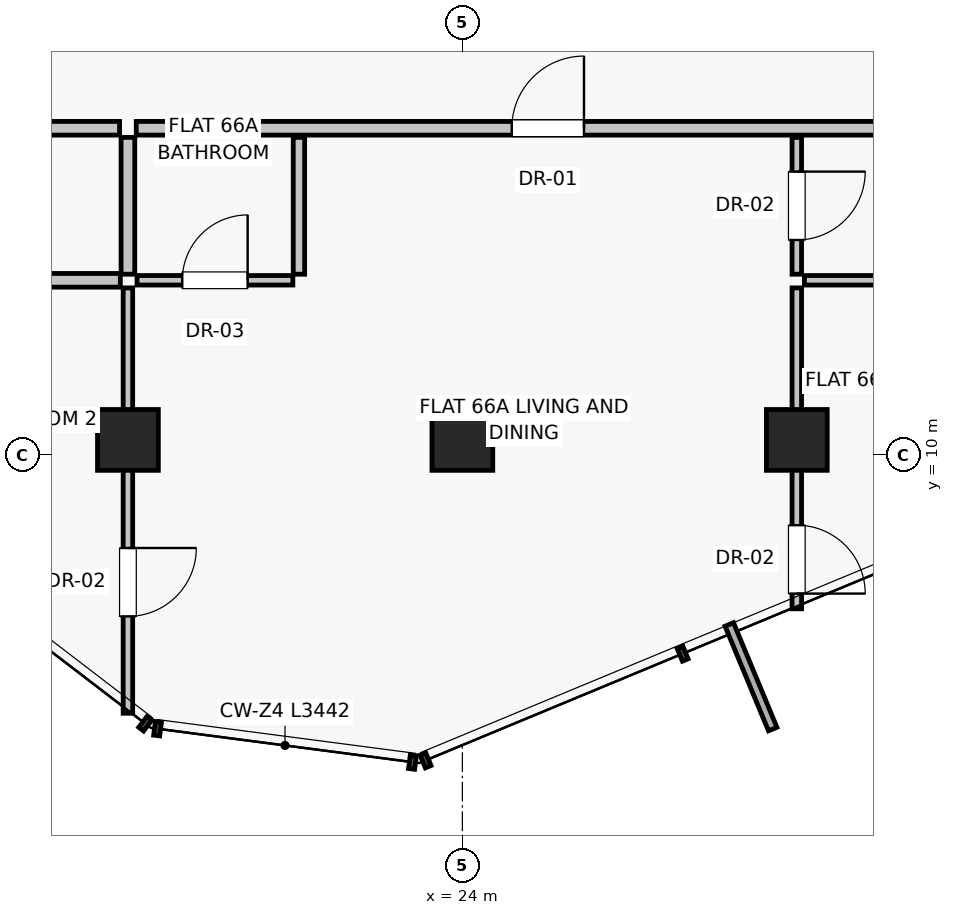
"""IFC4 building model, lengths in metres.
Left out: names, types, materials, properties, quantities, classifications, styles, units other than length and angle.
Written with IfcOpenShell. Run it as: python <this file> out.ifc"""

import sys

from ifc_helpers import new_model, si_unit, direction, frame, frame_2d, origin, origin_2d, place, context, subcontext, project, spatial, rectangle, extrude, source, transform, mapped, element, fill, save


model = new_model("IFC4")
c1 = context("Model", 3, precision=1e-05, world=origin(), true_north=direction((0.0, 1.0)))
c2 = subcontext(c1, "Body", "Model", "MODEL_VIEW")
j1 = project(units=[si_unit("LENGTHUNIT", "METRE"), si_unit("PLANEANGLEUNIT", "RADIAN")], contexts=[c1])
p1 = place(None, origin())
s1 = spatial("IfcSite", under=j1, at=p1, CompositionType="ELEMENT")
p2 = place(p1, origin())
s2 = spatial("IfcBuilding", under=s1, at=p2, CompositionType="ELEMENT")
p3 = place(p2, frame((0.0, 0.0, 233.3)))
s3 = spatial("IfcBuildingStorey", under=s2, at=p3, CompositionType="ELEMENT", Elevation=233.3)
for number, where, z_axis, x_axis in (
    (1, (19.6, 10.2, 0.0), (0.0, 0.0, 1.0), (1.0, 0.0, 0.0)),
    (2, (24.0, 10.2, 0.0), (0.0, 0.0, 1.0), (1.0, 0.0, 0.0)),
    (3, (28.4, 10.2, 0.0), (0.0, 0.0, 1.0), (1.0, 0.0, 0.0)),
):
    element("IfcColumn", number, at=place(p3, frame(where, z_axis=z_axis, x_axis=x_axis)), inside=s3, PredefinedType="COLUMN", context=c2, shape_type="SweptSolid", body=[
        extrude(rectangle(XDim=0.8, YDim=0.8, at=origin_2d()), origin(), (0.0, 0.0, 1.0), 3.25),
    ])
p4 = place(p3, frame((15.31, 14.3, 0.0), z_axis=(0.0, 0.0, 1.0), x_axis=(1.0, 0.0, 0.0)))
e4 = element("IfcWall", 4, at=p4, inside=s3, PredefinedType="PARTITIONING", context=c2, shape_type="SweptSolid", body=[
    extrude(rectangle(XDim=4.18, YDim=0.18, at=frame_2d((2.09, 0.0))), origin(), (0.0, 0.0, 1.0), 3.015),
])
p5 = place(p4, frame((1.59, 0.0, 0.0)))
e5 = element("IfcOpeningElement", 5, at=p5, cuts=e4, PredefinedType="OPENING", context=c2, shape_type="SweptSolid", body=[
    extrude(rectangle(XDim=1.0, YDim=2.01, at=frame_2d((0.5, 1.005))), frame((0.0, 0.1, 0.0), z_axis=(0.0, -1.0, 0.0), x_axis=(1.0, 0.0, 0.0)), (0.0, 0.0, 1.0), 0.2),
])
p6 = place(p3, frame((19.71, 14.3, 0.0), z_axis=(0.0, 0.0, 1.0), x_axis=(1.0, 0.0, 0.0)))
e6 = element("IfcWall", 6, at=p6, inside=s3, PredefinedType="PARTITIONING", context=c2, shape_type="SweptSolid", body=[
    extrude(rectangle(XDim=11.38, YDim=0.18, at=frame_2d((5.69, 0.0))), origin(), (0.0, 0.0, 1.0), 3.015),
])
p7 = place(p6, frame((4.94, 0.0, 0.0)))
e7 = element("IfcOpeningElement", 7, at=p7, cuts=e6, PredefinedType="OPENING", context=c2, shape_type="SweptSolid", body=[
    extrude(rectangle(XDim=0.95, YDim=2.02, at=frame_2d((0.475, 1.01))), frame((0.0, 0.1, 0.0), z_axis=(0.0, -1.0, 0.0), x_axis=(1.0, 0.0, 0.0)), (0.0, 0.0, 1.0), 0.2),
])
p8 = place(p3, frame((15.32, 12.3, 0.0), z_axis=(0.0, 0.0, 1.0), x_axis=(1.0, 0.0, 0.0)))
e8 = element("IfcWall", 8, at=p8, inside=s3, PredefinedType="PARTITIONING", context=c2, shape_type="SweptSolid", body=[
    extrude(rectangle(XDim=4.18, YDim=0.18, at=frame_2d((2.09, 0.0))), origin(), (0.0, 0.0, 1.0), 3.015),
])
p9 = place(p3, frame((19.6, 14.18, 0.0), z_axis=(0.0, 0.0, 1.0), x_axis=(0.0, -1.0, 0.0)))
e9 = element("IfcWall", 9, at=p9, inside=s3, PredefinedType="PARTITIONING", context=c2, shape_type="SweptSolid", body=[
    extrude(rectangle(XDim=1.8, YDim=0.18, at=frame_2d((0.9, 0.0))), origin(), (0.0, 0.0, 1.0), 2.543),
])
p10 = place(p3, frame((19.6, 12.2, 0.0), z_axis=(0.0, 0.0, 1.0), x_axis=(0.0, -1.0, 0.0)))
e10 = element("IfcWall", 10, at=p10, inside=s3, PredefinedType="PARTITIONING", context=c2, shape_type="SweptSolid", body=[
    extrude(rectangle(XDim=5.596, YDim=0.125, at=frame_2d((2.798, 0.0))), origin(), (0.0, 0.0, 1.0), 2.543),
])
p11 = place(p10, frame((3.422, 0.0, 0.0)))
e11 = element("IfcOpeningElement", 11, at=p11, cuts=e10, PredefinedType="OPENING", context=c2, shape_type="SweptSolid", body=[
    extrude(rectangle(XDim=0.9, YDim=2.01, at=frame_2d((0.45, 1.005))), frame((0.0, 0.073, 0.0), z_axis=(0.0, -1.0, 0.0), x_axis=(1.0, 0.0, 0.0)), (0.0, 0.0, 1.0), 0.145),
])
p12 = place(p3, frame((21.85, 14.18, 0.0), z_axis=(0.0, 0.0, 1.0), x_axis=(0.0, -1.0, 0.0)))
e12 = element("IfcWall", 12, at=p12, inside=s3, PredefinedType="PARTITIONING", context=c2, shape_type="SweptSolid", body=[
    extrude(rectangle(XDim=1.8, YDim=0.15, at=frame_2d((0.9, 0.0))), origin(), (0.0, 0.0, 1.0), 3.015),
])
p13 = place(p3, frame((19.72, 12.3, 0.0), z_axis=(0.0, 0.0, 1.0), x_axis=(1.0, 0.0, 0.0)))
e13 = element("IfcWall", 13, at=p13, inside=s3, PredefinedType="PARTITIONING", context=c2, shape_type="SweptSolid", body=[
    extrude(rectangle(XDim=2.05, YDim=0.125, at=frame_2d((1.025, 0.0))), origin(), (0.0, 0.0, 1.0), 3.015),
])
p14 = place(p13, frame((0.595, 0.0, 0.0)))
e14 = element("IfcOpeningElement", 14, at=p14, cuts=e13, PredefinedType="OPENING", context=c2, shape_type="SweptSolid", body=[
    extrude(rectangle(XDim=0.86, YDim=2.01, at=frame_2d((0.43, 1.005))), frame((0.0, 0.073, 0.0), z_axis=(0.0, -1.0, 0.0), x_axis=(1.0, 0.0, 0.0)), (0.0, 0.0, 1.0), 0.145),
])
p15 = place(p3, frame((28.4, 14.18, 0.0), z_axis=(0.0, 0.0, 1.0), x_axis=(0.0, -1.0, 0.0)))
e15 = element("IfcWall", 15, at=p15, inside=s3, PredefinedType="PARTITIONING", context=c2, shape_type="SweptSolid", body=[
    extrude(rectangle(XDim=1.8, YDim=0.125, at=frame_2d((0.9, 0.0))), origin(), (0.0, 0.0, 1.0), 3.015),
])
p16 = place(p15, frame((0.45, 0.0, 0.0)))
e16 = element("IfcOpeningElement", 16, at=p16, cuts=e15, PredefinedType="OPENING", context=c2, shape_type="SweptSolid", body=[
    extrude(rectangle(XDim=0.9, YDim=2.01, at=frame_2d((0.45, 1.005))), frame((0.0, 0.073, 0.0), z_axis=(0.0, -1.0, 0.0), x_axis=(1.0, 0.0, 0.0)), (0.0, 0.0, 1.0), 0.145),
])
p17 = place(p3, frame((28.5, 12.3, 0.0), z_axis=(0.0, 0.0, 1.0), x_axis=(1.0, 0.0, 0.0)))
e17 = element("IfcWall", 17, at=p17, inside=s3, PredefinedType="PARTITIONING", context=c2, shape_type="SweptSolid", body=[
    extrude(rectangle(XDim=2.58, YDim=0.125, at=frame_2d((1.29, 0.0))), origin(), (0.0, 0.0, 1.0), 3.015),
])
p18 = place(p3, frame((28.4, 12.2, 0.0), z_axis=(0.0, 0.0, 1.0), x_axis=(0.0, -1.0, 0.0)))
e18 = element("IfcWall", 18, at=p18, inside=s3, PredefinedType="PARTITIONING", context=c2, shape_type="SweptSolid", body=[
    extrude(rectangle(XDim=4.222, YDim=0.125, at=frame_2d((2.111, 0.0))), origin(), (0.0, 0.0, 1.0), 3.015),
])
p19 = place(p18, frame((3.122, 0.0, 0.0)))
e19 = element("IfcOpeningElement", 19, at=p19, cuts=e18, PredefinedType="OPENING", context=c2, shape_type="SweptSolid", body=[
    extrude(rectangle(XDim=0.9, YDim=2.01, at=frame_2d((0.45, 1.005))), frame((0.0, 0.073, 0.0), z_axis=(0.0, -1.0, 0.0), x_axis=(1.0, 0.0, 0.0)), (0.0, 0.0, 1.0), 0.145),
])
m1 = source(origin(), c2, "Body", "SweptSolid", [
    extrude(rectangle(XDim=0.95, YDim=2.02, at=frame_2d((0.475, 1.01))), frame((0.0, 0.025, 0.0), z_axis=(0.0, -1.0, 0.0), x_axis=(1.0, 0.0, 0.0)), (0.0, 0.0, 1.0), 0.05),
])
p20 = place(p7, origin())
e20 = element("IfcDoor", 20, at=p20, inside=s3, OperationType="SINGLE_SWING_RIGHT", PredefinedType="DOOR", context=c2, shape_type="MappedRepresentation", body=[
    mapped(m1, transform((0.0, 0.0, 0.0), scale=1.0)),
])
fill(e7, e20)
m2 = source(origin(), c2, "Body", "SweptSolid", [
    extrude(rectangle(XDim=0.9, YDim=2.01, at=frame_2d((0.45, 1.005))), frame((0.0, 0.025, 0.0), z_axis=(0.0, -1.0, 0.0), x_axis=(1.0, 0.0, 0.0)), (0.0, 0.0, 1.0), 0.05),
])
p21 = place(p11, origin())
e21 = element("IfcDoor", 21, at=p21, inside=s3, OperationType="SINGLE_SWING_LEFT", PredefinedType="DOOR", context=c2, shape_type="MappedRepresentation", body=[
    mapped(m2, transform((0.0, 0.0, 0.0), scale=1.0)),
])
fill(e11, e21)
m3 = source(origin(), c2, "Body", "SweptSolid", [
    extrude(rectangle(XDim=0.86, YDim=2.01, at=frame_2d((0.43, 1.005))), frame((0.0, 0.025, 0.0), z_axis=(0.0, -1.0, 0.0), x_axis=(1.0, 0.0, 0.0)), (0.0, 0.0, 1.0), 0.05),
])
p22 = place(p14, origin())
e22 = element("IfcDoor", 22, at=p22, inside=s3, OperationType="SINGLE_SWING_RIGHT", PredefinedType="DOOR", context=c2, shape_type="MappedRepresentation", body=[
    mapped(m3, transform((0.0, 0.0, 0.0), scale=1.0)),
])
fill(e14, e22)
p23 = place(p16, origin())
e23 = element("IfcDoor", 23, at=p23, inside=s3, OperationType="SINGLE_SWING_LEFT", PredefinedType="DOOR", context=c2, shape_type="MappedRepresentation", body=[
    mapped(m2, transform((0.0, 0.0, 0.0), scale=1.0)),
])
fill(e16, e23)
p24 = place(p19, origin())
e24 = element("IfcDoor", 24, at=p24, inside=s3, OperationType="SINGLE_SWING_RIGHT", PredefinedType="DOOR", context=c2, shape_type="MappedRepresentation", body=[
    mapped(m2, transform((0.0, 0.0, 0.0), scale=1.0)),
])
fill(e19, e24)
save(model, sys.argv[1])
